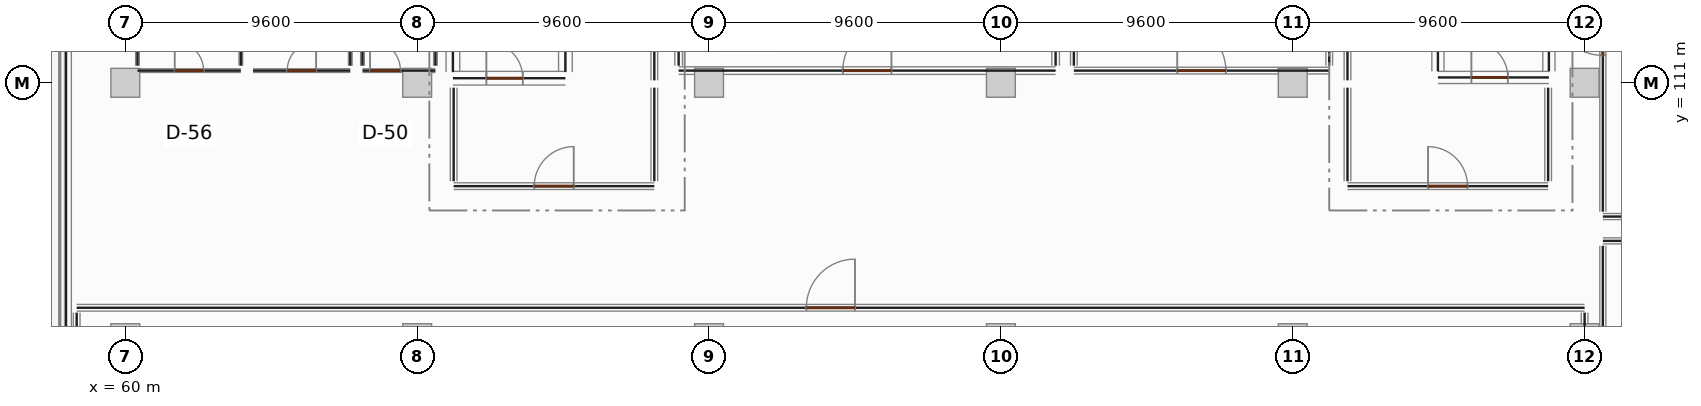
"""IFC4 building model, lengths in metres.
Left out: names, types, materials, properties, quantities, classifications, styles, units other than length and angle.
Written with IfcOpenShell. Run it as: python <this file> out.ifc"""

import sys

from ifc_helpers import new_model, si_unit, direction, frame, frame_2d, origin, origin_2d, place, context, subcontext, project, spatial, polyline, rectangle, outline, extrude, element, fill, save


model = new_model("IFC4")
c1 = context("Model", 3, precision=1e-05, world=origin(), true_north=direction((0.0, 1.0)))
c2 = subcontext(c1, "Body", "Model", "MODEL_VIEW")
j1 = project(units=[si_unit("LENGTHUNIT", "METRE"), si_unit("PLANEANGLEUNIT", "RADIAN")], contexts=[c1])
p1 = place(None, origin())
s1 = spatial("IfcSite", under=j1, at=p1, CompositionType="ELEMENT")
p2 = place(p1, origin())
s2 = spatial("IfcBuilding", under=s1, at=p2, CompositionType="ELEMENT")
p3 = place(p2, frame((0.0, 0.0, -4.5)))
s3 = spatial("IfcBuildingStorey", under=s2, at=p3, CompositionType="ELEMENT", Elevation=-4.5)
p4 = place(p3, frame((58.05, 90.0, 0.0), z_axis=(0.0, 0.0, 1.0), x_axis=(0.0, 1.0, 0.0)))
e1 = element("IfcWall", 1, at=p4, inside=s3, PredefinedType="SHEAR", context=c2, shape_type="SweptSolid", body=[
    extrude(outline(polyline([(0.0, 0.0), (27.0, 0.0), (27.0, 4.12), (0.0, 0.0), (0.0, 0.0)])), frame((0.0, 0.175, 0.0), z_axis=(0.0, -1.0, 0.0), x_axis=(1.0, 0.0, 0.0)), (0.0, 0.0, 1.0), 0.35),
])
for number, where, z_axis, x_axis in (
    (2, (60.0, 102.6, 0.0), (0.0, 0.0, 1.0), (1.0, 0.0, 0.0)),
    (3, (60.0, 111.0, 0.0), (0.0, 0.0, 1.0), (1.0, 0.0, 0.0)),
    (4, (69.6, 102.6, 0.0), (0.0, 0.0, 1.0), (1.0, 0.0, 0.0)),
    (5, (69.6, 111.0, 0.0), (0.0, 0.0, 1.0), (1.0, 0.0, 0.0)),
    (6, (79.2, 102.6, 0.0), (0.0, 0.0, 1.0), (1.0, 0.0, 0.0)),
    (7, (79.2, 111.0, 0.0), (0.0, 0.0, 1.0), (1.0, 0.0, 0.0)),
    (8, (88.8, 102.6, 0.0), (0.0, 0.0, 1.0), (1.0, 0.0, 0.0)),
    (9, (88.8, 111.0, 0.0), (0.0, 0.0, 1.0), (1.0, 0.0, 0.0)),
    (10, (98.4, 102.6, 0.0), (0.0, 0.0, 1.0), (1.0, 0.0, 0.0)),
    (11, (98.4, 111.0, 0.0), (0.0, 0.0, 1.0), (1.0, 0.0, 0.0)),
    (12, (108.0, 102.6, 0.0), (0.0, 0.0, 1.0), (1.0, 0.0, 0.0)),
    (13, (108.0, 111.0, 0.0), (0.0, 0.0, 1.0), (1.0, 0.0, 0.0)),
):
    element("IfcColumn", number, at=place(p3, frame(where, z_axis=z_axis, x_axis=x_axis)), inside=s3, PredefinedType="COLUMN", context=c2, shape_type="SweptSolid", body=[
        extrude(rectangle(XDim=0.95, YDim=0.95, at=origin_2d()), origin(), (0.0, 0.0, 1.0), 4.14),
    ])
p5 = place(p3, frame((70.775, 111.15, 0.0), z_axis=(0.0, 0.0, 1.0), x_axis=(1.0, 0.0, 0.0)))
e14 = element("IfcWall", 14, at=p5, inside=s3, PredefinedType="SHEAR", context=c2, shape_type="SweptSolid", body=[
    extrude(rectangle(XDim=3.7, YDim=0.45, at=frame_2d((1.85, 0.0))), origin(), (0.0, 0.0, 1.0), 4.14),
])
p6 = place(p5, frame((1.1, 0.0, 0.0)))
e15 = element("IfcOpeningElement", 15, at=p6, cuts=e14, PredefinedType="OPENING", context=c2, shape_type="SweptSolid", body=[
    extrude(rectangle(XDim=1.2, YDim=2.2, at=frame_2d((0.6, 1.1))), frame((0.0, 0.235, 0.0), z_axis=(0.0, -1.0, 0.0), x_axis=(1.0, 0.0, 0.0)), (0.0, 0.0, 1.0), 0.47),
])
for number, where, z_axis, x_axis in (
    (16, (70.775, 111.35, 0.0), (0.0, 0.0, 1.0), (0.0, 1.0, 0.0)),
    (17, (74.475, 111.35, 0.0), (0.0, 0.0, 1.0), (0.0, 1.0, 0.0)),
):
    element("IfcWall", number, at=place(p3, frame(where, z_axis=z_axis, x_axis=x_axis)), inside=s3, PredefinedType="SHEAR", context=c2, shape_type="SweptSolid", body=[
        extrude(rectangle(XDim=7.675, YDim=0.45, at=frame_2d((3.837, 0.0))), origin(), (0.0, 0.0, 1.0), 4.14),
    ])
p7 = place(p3, frame((103.175, 111.175, 0.0), z_axis=(0.0, 0.0, 1.0), x_axis=(1.0, 0.0, 0.0)))
e18 = element("IfcWall", 18, at=p7, inside=s3, PredefinedType="SHEAR", context=c2, shape_type="SweptSolid", body=[
    extrude(rectangle(XDim=3.65, YDim=0.4, at=frame_2d((1.825, 0.0))), origin(), (0.0, 0.0, 1.0), 4.14),
])
p8 = place(p7, frame((1.1, 0.0, 0.0)))
e19 = element("IfcOpeningElement", 19, at=p8, cuts=e18, PredefinedType="OPENING", context=c2, shape_type="SweptSolid", body=[
    extrude(rectangle(XDim=1.2, YDim=2.2, at=frame_2d((0.6, 1.1))), frame((0.0, 0.21, 0.0), z_axis=(0.0, -1.0, 0.0), x_axis=(1.0, 0.0, 0.0)), (0.0, 0.0, 1.0), 0.42),
])
for number, where, z_axis, x_axis in (
    (20, (103.175, 111.375, 0.0), (0.0, 0.0, 1.0), (0.0, 1.0, 0.0)),
    (21, (106.825, 111.375, 0.0), (0.0, 0.0, 1.0), (0.0, 1.0, 0.0)),
):
    element("IfcWall", number, at=place(p3, frame(where, z_axis=z_axis, x_axis=x_axis)), inside=s3, PredefinedType="SHEAR", context=c2, shape_type="SweptSolid", body=[
        extrude(rectangle(XDim=7.625, YDim=0.4, at=frame_2d((3.812, 0.0))), origin(), (0.0, 0.0, 1.0), 4.14),
    ])
p9 = place(p3, frame((70.8, 107.6, 0.0), z_axis=(0.0, 0.0, 1.0), x_axis=(1.0, 0.0, 0.0)))
e22 = element("IfcWall", 22, at=p9, inside=s3, PredefinedType="PARTITIONING", context=c2, shape_type="SweptSolid", body=[
    extrude(rectangle(XDim=6.6, YDim=0.22, at=frame_2d((3.3, 0.0))), origin(), (0.0, 0.0, 1.0), 3.22),
])
p10 = place(p9, frame((2.65, 0.0, 0.0)))
e23 = element("IfcOpeningElement", 23, at=p10, cuts=e22, PredefinedType="OPENING", context=c2, shape_type="SweptSolid", body=[
    extrude(rectangle(XDim=1.3, YDim=2.2, at=frame_2d((0.65, 1.1))), frame((0.0, 0.12, 0.0), z_axis=(0.0, -1.0, 0.0), x_axis=(1.0, 0.0, 0.0)), (0.0, 0.0, 1.0), 0.24),
])
p11 = place(p3, frame((77.4, 111.08, 0.0), z_axis=(0.0, 0.0, 1.0), x_axis=(0.0, 1.0, 0.0)))
e24 = element("IfcWall", 24, at=p11, inside=s3, PredefinedType="PARTITIONING", context=c2, shape_type="SweptSolid", body=[
    extrude(rectangle(XDim=2.32, YDim=0.22, at=frame_2d((1.16, 0.0))), origin(), (0.0, 0.0, 1.0), 3.22),
])
for number, where, z_axis, x_axis in (
    (25, (70.8, 107.76, 0.0), (0.0, 0.0, 1.0), (0.0, 1.0, 0.0)),
    (26, (77.4, 107.76, 0.0), (0.0, 0.0, 1.0), (0.0, 1.0, 0.0)),
):
    element("IfcWall", number, at=place(p3, frame(where, z_axis=z_axis, x_axis=x_axis)), inside=s3, PredefinedType="PARTITIONING", context=c2, shape_type="SweptSolid", body=[
        extrude(rectangle(XDim=3.08, YDim=0.22, at=frame_2d((1.54, 0.0))), origin(), (0.0, 0.0, 1.0), 3.22),
    ])
p12 = place(p3, frame((100.2, 107.6, 0.0), z_axis=(0.0, 0.0, 1.0), x_axis=(1.0, 0.0, 0.0)))
e27 = element("IfcWall", 27, at=p12, inside=s3, PredefinedType="PARTITIONING", context=c2, shape_type="SweptSolid", body=[
    extrude(rectangle(XDim=6.6, YDim=0.22, at=frame_2d((3.3, 0.0))), origin(), (0.0, 0.0, 1.0), 3.22),
])
p13 = place(p12, frame((2.65, 0.0, 0.0)))
e28 = element("IfcOpeningElement", 28, at=p13, cuts=e27, PredefinedType="OPENING", context=c2, shape_type="SweptSolid", body=[
    extrude(rectangle(XDim=1.3, YDim=2.2, at=frame_2d((0.65, 1.1))), frame((0.0, 0.12, 0.0), z_axis=(0.0, -1.0, 0.0), x_axis=(1.0, 0.0, 0.0)), (0.0, 0.0, 1.0), 0.24),
])
p14 = place(p3, frame((100.2, 111.08, 0.0), z_axis=(0.0, 0.0, 1.0), x_axis=(0.0, 1.0, 0.0)))
e29 = element("IfcWall", 29, at=p14, inside=s3, PredefinedType="PARTITIONING", context=c2, shape_type="SweptSolid", body=[
    extrude(rectangle(XDim=2.32, YDim=0.22, at=frame_2d((1.16, 0.0))), origin(), (0.0, 0.0, 1.0), 3.22),
])
for number, where, z_axis, x_axis in (
    (30, (100.2, 107.76, 0.0), (0.0, 0.0, 1.0), (0.0, 1.0, 0.0)),
    (31, (106.8, 107.76, 0.0), (0.0, 0.0, 1.0), (0.0, 1.0, 0.0)),
):
    element("IfcWall", number, at=place(p3, frame(where, z_axis=z_axis, x_axis=x_axis)), inside=s3, PredefinedType="PARTITIONING", context=c2, shape_type="SweptSolid", body=[
        extrude(rectangle(XDim=3.08, YDim=0.22, at=frame_2d((1.54, 0.0))), origin(), (0.0, 0.0, 1.0), 3.22),
    ])
p15 = place(p3, frame((108.6, 105.8, 0.0), z_axis=(0.0, 0.0, 1.0), x_axis=(1.0, 0.0, 0.0)))
e32 = element("IfcWall", 32, at=p15, inside=s3, PredefinedType="PARTITIONING", context=c2, shape_type="SweptSolid", body=[
    extrude(rectangle(XDim=17.8, YDim=0.2, at=frame_2d((8.9, 0.0))), origin(), (0.0, 0.0, 1.0), 3.22),
])
p16 = place(p3, frame((108.6, 94.56, 0.0), z_axis=(0.0, 0.0, 1.0), x_axis=(0.0, 1.0, 0.0)))
e33 = element("IfcWall", 33, at=p16, inside=s3, PredefinedType="PARTITIONING", context=c2, shape_type="SweptSolid", body=[
    extrude(rectangle(XDim=11.08, YDim=0.2, at=frame_2d((5.54, 0.0))), origin(), (0.0, 0.0, 1.0), 3.22),
])
p17 = place(p16, frame((4.99, 0.0, 0.0)))
e34 = element("IfcOpeningElement", 34, at=p17, cuts=e33, PredefinedType="OPENING", context=c2, shape_type="SweptSolid", body=[
    extrude(rectangle(XDim=1.1, YDim=2.2, at=frame_2d((0.55, 1.1))), frame((0.0, 0.11, 0.0), z_axis=(0.0, -1.0, 0.0), x_axis=(1.0, 0.0, 0.0)), (0.0, 0.0, 1.0), 0.22),
])
p18 = place(p3, frame((78.2, 111.4, 0.0), z_axis=(0.0, 0.0, 1.0), x_axis=(1.0, 0.0, 0.0)))
e35 = element("IfcWall", 35, at=p18, inside=s3, PredefinedType="PARTITIONING", context=c2, shape_type="SweptSolid", body=[
    extrude(rectangle(XDim=12.4, YDim=0.25, at=frame_2d((6.2, 0.0))), origin(), (0.0, 0.0, 1.0), 3.22),
])
p19 = place(p18, frame((5.4, 0.0, 0.0)))
e36 = element("IfcOpeningElement", 36, at=p19, cuts=e35, PredefinedType="OPENING", context=c2, shape_type="SweptSolid", body=[
    extrude(rectangle(XDim=1.6, YDim=2.3, at=frame_2d((0.8, 1.15))), frame((0.0, 0.135, 0.0), z_axis=(0.0, -1.0, 0.0), x_axis=(1.0, 0.0, 0.0)), (0.0, 0.0, 1.0), 0.27),
])
for number, where, z_axis, x_axis in (
    (37, (78.2, 111.56, 0.0), (0.0, 0.0, 1.0), (0.0, 1.0, 0.0)),
    (38, (90.6, 111.56, 0.0), (0.0, 0.0, 1.0), (0.0, 1.0, 0.0)),
):
    element("IfcWall", number, at=place(p3, frame(where, z_axis=z_axis, x_axis=x_axis)), inside=s3, PredefinedType="PARTITIONING", context=c2, shape_type="SweptSolid", body=[
        extrude(rectangle(XDim=7.08, YDim=0.25, at=frame_2d((3.54, 0.0))), origin(), (0.0, 0.0, 1.0), 3.22),
    ])
p20 = place(p3, frame((91.2, 111.4, 0.0), z_axis=(0.0, 0.0, 1.0), x_axis=(1.0, 0.0, 0.0)))
e39 = element("IfcWall", 39, at=p20, inside=s3, PredefinedType="PARTITIONING", context=c2, shape_type="SweptSolid", body=[
    extrude(rectangle(XDim=8.4, YDim=0.22, at=frame_2d((4.2, 0.0))), origin(), (0.0, 0.0, 1.0), 3.22),
])
p21 = place(p20, frame((3.4, 0.0, 0.0)))
e40 = element("IfcOpeningElement", 40, at=p21, cuts=e39, PredefinedType="OPENING", context=c2, shape_type="SweptSolid", body=[
    extrude(rectangle(XDim=1.6, YDim=2.3, at=frame_2d((0.8, 1.15))), frame((0.0, 0.12, 0.0), z_axis=(0.0, -1.0, 0.0), x_axis=(1.0, 0.0, 0.0)), (0.0, 0.0, 1.0), 0.24),
])
for number, where, z_axis, x_axis in (
    (41, (91.2, 111.56, 0.0), (0.0, 0.0, 1.0), (0.0, 1.0, 0.0)),
    (42, (99.6, 111.56, 0.0), (0.0, 0.0, 1.0), (0.0, 1.0, 0.0)),
):
    element("IfcWall", number, at=place(p3, frame(where, z_axis=z_axis, x_axis=x_axis)), inside=s3, PredefinedType="PARTITIONING", context=c2, shape_type="SweptSolid", body=[
        extrude(rectangle(XDim=7.08, YDim=0.22, at=frame_2d((3.54, 0.0))), origin(), (0.0, 0.0, 1.0), 3.22),
    ])
p22 = place(p3, frame((108.6, 106.6, 0.0), z_axis=(0.0, 0.0, 1.0), x_axis=(1.0, 0.0, 0.0)))
e43 = element("IfcWall", 43, at=p22, inside=s3, PredefinedType="PARTITIONING", context=c2, shape_type="SweptSolid", body=[
    extrude(rectangle(XDim=17.8, YDim=0.2, at=frame_2d((8.9, 0.0))), origin(), (0.0, 0.0, 1.0), 3.22),
])
p23 = place(p3, frame((108.6, 106.76, 0.0), z_axis=(0.0, 0.0, 1.0), x_axis=(0.0, 1.0, 0.0)))
e44 = element("IfcWall", 44, at=p23, inside=s3, PredefinedType="PARTITIONING", context=c2, shape_type="SweptSolid", body=[
    extrude(rectangle(XDim=11.88, YDim=0.2, at=frame_2d((5.94, 0.0))), origin(), (0.0, 0.0, 1.0), 3.22),
])
p24 = place(p23, frame((5.14, 0.0, 0.0)))
e45 = element("IfcOpeningElement", 45, at=p24, cuts=e44, PredefinedType="OPENING", context=c2, shape_type="SweptSolid", body=[
    extrude(rectangle(XDim=1.6, YDim=2.3, at=frame_2d((0.8, 1.15))), frame((0.0, 0.11, 0.0), z_axis=(0.0, -1.0, 0.0), x_axis=(1.0, 0.0, 0.0)), (0.0, 0.0, 1.0), 0.22),
])
p25 = place(p3, frame((60.4, 111.4, 0.0), z_axis=(0.0, 0.0, 1.0), x_axis=(1.0, 0.0, 0.0)))
e46 = element("IfcWall", 46, at=p25, inside=s3, PredefinedType="PARTITIONING", context=c2, shape_type="SweptSolid", body=[
    extrude(rectangle(XDim=3.4, YDim=0.12, at=frame_2d((1.7, 0.0))), origin(), (0.0, 0.0, 1.0), 3.22),
])
p26 = place(p25, frame((1.225, 0.0, 0.0)))
e47 = element("IfcOpeningElement", 47, at=p26, cuts=e46, PredefinedType="OPENING", context=c2, shape_type="SweptSolid", body=[
    extrude(rectangle(XDim=0.95, YDim=2.1, at=frame_2d((0.475, 1.05))), frame((0.0, 0.07, 0.0), z_axis=(0.0, -1.0, 0.0), x_axis=(1.0, 0.0, 0.0)), (0.0, 0.0, 1.0), 0.14),
])
for number, where, z_axis, x_axis in (
    (48, (60.4, 111.56, 0.0), (0.0, 0.0, 1.0), (0.0, 1.0, 0.0)),
    (49, (63.8, 111.56, 0.0), (0.0, 0.0, 1.0), (0.0, 1.0, 0.0)),
):
    element("IfcWall", number, at=place(p3, frame(where, z_axis=z_axis, x_axis=x_axis)), inside=s3, PredefinedType="PARTITIONING", context=c2, shape_type="SweptSolid", body=[
        extrude(rectangle(XDim=6.88, YDim=0.12, at=frame_2d((3.44, 0.0))), origin(), (0.0, 0.0, 1.0), 3.22),
    ])
p27 = place(p3, frame((64.2, 111.4, 0.0), z_axis=(0.0, 0.0, 1.0), x_axis=(1.0, 0.0, 0.0)))
e50 = element("IfcWall", 50, at=p27, inside=s3, PredefinedType="PARTITIONING", context=c2, shape_type="SweptSolid", body=[
    extrude(rectangle(XDim=3.2, YDim=0.12, at=frame_2d((1.6, 0.0))), origin(), (0.0, 0.0, 1.0), 3.22),
])
p28 = place(p27, frame((1.125, 0.0, 0.0)))
e51 = element("IfcOpeningElement", 51, at=p28, cuts=e50, PredefinedType="OPENING", context=c2, shape_type="SweptSolid", body=[
    extrude(rectangle(XDim=0.95, YDim=2.1, at=frame_2d((0.475, 1.05))), frame((0.0, 0.07, 0.0), z_axis=(0.0, -1.0, 0.0), x_axis=(1.0, 0.0, 0.0)), (0.0, 0.0, 1.0), 0.14),
])
p29 = place(p3, frame((67.4, 111.56, 0.0), z_axis=(0.0, 0.0, 1.0), x_axis=(0.0, 1.0, 0.0)))
e52 = element("IfcWall", 52, at=p29, inside=s3, PredefinedType="PARTITIONING", context=c2, shape_type="SweptSolid", body=[
    extrude(rectangle(XDim=6.88, YDim=0.12, at=frame_2d((3.44, 0.0))), origin(), (0.0, 0.0, 1.0), 3.22),
])
p30 = place(p3, frame((67.8, 111.4, 0.0), z_axis=(0.0, 0.0, 1.0), x_axis=(1.0, 0.0, 0.0)))
e53 = element("IfcWall", 53, at=p30, inside=s3, PredefinedType="PARTITIONING", context=c2, shape_type="SweptSolid", body=[
    extrude(rectangle(XDim=2.4, YDim=0.12, at=frame_2d((1.2, 0.0))), origin(), (0.0, 0.0, 1.0), 3.22),
])
p31 = place(p30, frame((0.25, 0.0, 0.0)))
e54 = element("IfcOpeningElement", 54, at=p31, cuts=e53, PredefinedType="OPENING", context=c2, shape_type="SweptSolid", body=[
    extrude(rectangle(XDim=1.0, YDim=2.15, at=frame_2d((0.5, 1.075))), frame((0.0, 0.07, 0.0), z_axis=(0.0, -1.0, 0.0), x_axis=(1.0, 0.0, 0.0)), (0.0, 0.0, 1.0), 0.14),
])
for number, where, z_axis, x_axis in (
    (55, (67.8, 111.56, 0.0), (0.0, 0.0, 1.0), (0.0, 1.0, 0.0)),
    (56, (70.2, 111.56, 0.0), (0.0, 0.0, 1.0), (0.0, 1.0, 0.0)),
):
    element("IfcWall", number, at=place(p3, frame(where, z_axis=z_axis, x_axis=x_axis)), inside=s3, PredefinedType="PARTITIONING", context=c2, shape_type="SweptSolid", body=[
        extrude(rectangle(XDim=4.28, YDim=0.12, at=frame_2d((2.14, 0.0))), origin(), (0.0, 0.0, 1.0), 3.22),
    ])
p32 = place(p3, frame((58.4, 103.6, 0.0), z_axis=(0.0, 0.0, 1.0), x_axis=(1.0, 0.0, 0.0)))
e57 = element("IfcWall", 57, at=p32, inside=s3, PredefinedType="PARTITIONING", context=c2, shape_type="SweptSolid", body=[
    extrude(rectangle(XDim=49.6, YDim=0.22, at=frame_2d((24.8, 0.0))), origin(), (0.0, 0.0, 1.0), 3.22),
])
p33 = place(p32, frame((24.0, 0.0, 0.0)))
e58 = element("IfcOpeningElement", 58, at=p33, cuts=e57, PredefinedType="OPENING", context=c2, shape_type="SweptSolid", body=[
    extrude(rectangle(XDim=1.6, YDim=2.3, at=frame_2d((0.8, 1.15))), frame((0.0, 0.12, 0.0), z_axis=(0.0, -1.0, 0.0), x_axis=(1.0, 0.0, 0.0)), (0.0, 0.0, 1.0), 0.24),
])
for number, where, z_axis, x_axis in (
    (59, (58.4, 78.16, 0.0), (0.0, 0.0, 1.0), (0.0, 1.0, 0.0)),
    (60, (108.0, 78.16, 0.0), (0.0, 0.0, 1.0), (0.0, 1.0, 0.0)),
):
    element("IfcWall", number, at=place(p3, frame(where, z_axis=z_axis, x_axis=x_axis)), inside=s3, PredefinedType="PARTITIONING", context=c2, shape_type="SweptSolid", body=[
        extrude(rectangle(XDim=25.28, YDim=0.22, at=frame_2d((12.64, 0.0))), origin(), (0.0, 0.0, 1.0), 3.22),
    ])
p34 = place(p6, origin())
e61 = element("IfcDoor", 61, at=p34, inside=s3, OperationType="SINGLE_SWING_LEFT", PredefinedType="DOOR", context=c2, shape_type="SweptSolid", body=[
    extrude(rectangle(XDim=1.2, YDim=2.2, at=frame_2d((0.6, 1.1))), frame((0.0, 0.025, 0.0), z_axis=(0.0, -1.0, 0.0), x_axis=(1.0, 0.0, 0.0)), (0.0, 0.0, 1.0), 0.05),
])
fill(e15, e61)
p35 = place(p8, origin())
e62 = element("IfcDoor", 62, at=p35, inside=s3, OperationType="SINGLE_SWING_LEFT", PredefinedType="DOOR", context=c2, shape_type="SweptSolid", body=[
    extrude(rectangle(XDim=1.2, YDim=2.2, at=frame_2d((0.6, 1.1))), frame((0.0, 0.025, 0.0), z_axis=(0.0, -1.0, 0.0), x_axis=(1.0, 0.0, 0.0)), (0.0, 0.0, 1.0), 0.05),
])
fill(e19, e62)
p36 = place(p10, origin())
e63 = element("IfcDoor", 63, at=p36, inside=s3, OperationType="SINGLE_SWING_RIGHT", PredefinedType="DOOR", context=c2, shape_type="SweptSolid", body=[
    extrude(rectangle(XDim=1.3, YDim=2.2, at=frame_2d((0.65, 1.1))), frame((0.0, 0.025, 0.0), z_axis=(0.0, -1.0, 0.0), x_axis=(1.0, 0.0, 0.0)), (0.0, 0.0, 1.0), 0.05),
])
fill(e23, e63)
p37 = place(p13, origin())
e64 = element("IfcDoor", 64, at=p37, inside=s3, OperationType="SINGLE_SWING_LEFT", PredefinedType="DOOR", context=c2, shape_type="SweptSolid", body=[
    extrude(rectangle(XDim=1.3, YDim=2.2, at=frame_2d((0.65, 1.1))), frame((0.0, 0.025, 0.0), z_axis=(0.0, -1.0, 0.0), x_axis=(1.0, 0.0, 0.0)), (0.0, 0.0, 1.0), 0.05),
])
fill(e28, e64)
p38 = place(p19, origin())
e65 = element("IfcDoor", 65, at=p38, inside=s3, OperationType="SINGLE_SWING_RIGHT", PredefinedType="DOOR", context=c2, shape_type="SweptSolid", body=[
    extrude(rectangle(XDim=1.6, YDim=2.3, at=frame_2d((0.8, 1.15))), frame((0.0, 0.025, 0.0), z_axis=(0.0, -1.0, 0.0), x_axis=(1.0, 0.0, 0.0)), (0.0, 0.0, 1.0), 0.05),
])
fill(e36, e65)
p39 = place(p21, origin())
e66 = element("IfcDoor", 66, at=p39, inside=s3, OperationType="SINGLE_SWING_LEFT", PredefinedType="DOOR", context=c2, shape_type="SweptSolid", body=[
    extrude(rectangle(XDim=1.6, YDim=2.3, at=frame_2d((0.8, 1.15))), frame((0.0, 0.025, 0.0), z_axis=(0.0, -1.0, 0.0), x_axis=(1.0, 0.0, 0.0)), (0.0, 0.0, 1.0), 0.05),
])
fill(e40, e66)
p40 = place(p24, origin())
e67 = element("IfcDoor", 67, at=p40, inside=s3, OperationType="SINGLE_SWING_RIGHT", PredefinedType="DOOR", context=c2, shape_type="SweptSolid", body=[
    extrude(rectangle(XDim=1.6, YDim=2.3, at=frame_2d((0.8, 1.15))), frame((0.0, 0.025, 0.0), z_axis=(0.0, -1.0, 0.0), x_axis=(1.0, 0.0, 0.0)), (0.0, 0.0, 1.0), 0.05),
])
fill(e45, e67)
p41 = place(p26, origin())
e68 = element("IfcDoor", 68, at=p41, inside=s3, OperationType="SINGLE_SWING_LEFT", PredefinedType="DOOR", context=c2, shape_type="SweptSolid", body=[
    extrude(rectangle(XDim=0.95, YDim=2.1, at=frame_2d((0.475, 1.05))), frame((0.0, 0.025, 0.0), z_axis=(0.0, -1.0, 0.0), x_axis=(1.0, 0.0, 0.0)), (0.0, 0.0, 1.0), 0.05),
])
fill(e47, e68)
p42 = place(p28, origin())
e69 = element("IfcDoor", 69, at=p42, inside=s3, OperationType="SINGLE_SWING_RIGHT", PredefinedType="DOOR", context=c2, shape_type="SweptSolid", body=[
    extrude(rectangle(XDim=0.95, YDim=2.1, at=frame_2d((0.475, 1.05))), frame((0.0, 0.025, 0.0), z_axis=(0.0, -1.0, 0.0), x_axis=(1.0, 0.0, 0.0)), (0.0, 0.0, 1.0), 0.05),
])
fill(e51, e69)
p43 = place(p31, origin())
e70 = element("IfcDoor", 70, at=p43, inside=s3, OperationType="SINGLE_SWING_LEFT", PredefinedType="DOOR", context=c2, shape_type="SweptSolid", body=[
    extrude(rectangle(XDim=1.0, YDim=2.15, at=frame_2d((0.5, 1.075))), frame((0.0, 0.025, 0.0), z_axis=(0.0, -1.0, 0.0), x_axis=(1.0, 0.0, 0.0)), (0.0, 0.0, 1.0), 0.05),
])
fill(e54, e70)
p44 = place(p33, origin())
e71 = element("IfcDoor", 71, at=p44, inside=s3, OperationType="SINGLE_SWING_RIGHT", PredefinedType="DOOR", context=c2, shape_type="SweptSolid", body=[
    extrude(rectangle(XDim=1.6, YDim=2.3, at=frame_2d((0.8, 1.15))), frame((0.0, 0.025, 0.0), z_axis=(0.0, -1.0, 0.0), x_axis=(1.0, 0.0, 0.0)), (0.0, 0.0, 1.0), 0.05),
])
fill(e58, e71)
save(model, sys.argv[1])
